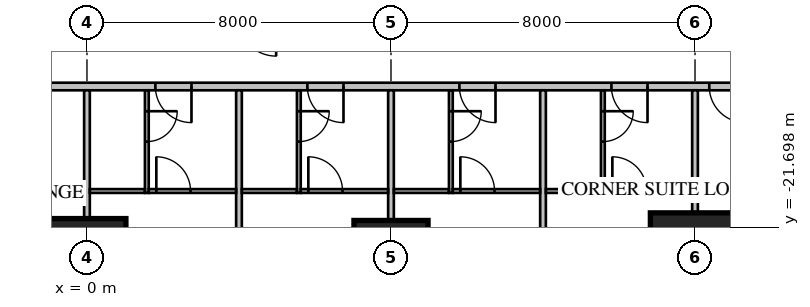
"""IFC4 building model, lengths in metres.
Left out: names, types, materials, properties, quantities, classifications, styles, units other than length and angle.
Written with IfcOpenShell. Run it as: python <this file> out.ifc"""

import sys

from ifc_helpers import new_model, si_unit, direction, frame, frame_2d, origin, origin_2d, place, context, subcontext, project, spatial, rectangle, extrude, element, fill, save


model = new_model("IFC4")
c1 = context("Model", 3, precision=1e-05, world=origin(), true_north=direction((0.0, 1.0)))
c2 = subcontext(c1, "Body", "Model", "MODEL_VIEW")
j1 = project(units=[si_unit("LENGTHUNIT", "METRE"), si_unit("PLANEANGLEUNIT", "RADIAN")], contexts=[c1])
p1 = place(None, origin())
s1 = spatial("IfcSite", under=j1, at=p1, CompositionType="ELEMENT")
p2 = place(p1, origin())
s2 = spatial("IfcBuilding", under=s1, at=p2, CompositionType="ELEMENT")
p3 = place(p2, frame((0.0, 0.0, 27.55)))
s3 = spatial("IfcBuildingStorey", under=s2, at=p3, CompositionType="ELEMENT", Elevation=27.55)
p4 = place(p3, frame((0.0, -22.5, 0.0), z_axis=(0.0, 0.0, 1.0), x_axis=(1.0, 0.0, 0.0)))
e1 = element("IfcColumn", 1, at=p4, inside=s3, PredefinedType="COLUMN", context=c2, shape_type="SweptSolid", body=[
    extrude(rectangle(XDim=2.05, YDim=2.05, at=origin_2d()), origin(), (0.0, 0.0, 1.0), 3.85),
])
p5 = place(p3, frame((8.0, -22.5, 0.0), z_axis=(0.0, 0.0, 1.0), x_axis=(1.0, 0.0, 0.0)))
e2 = element("IfcColumn", 2, at=p5, inside=s3, PredefinedType="COLUMN", context=c2, shape_type="SweptSolid", body=[
    extrude(rectangle(XDim=1.95, YDim=1.95, at=origin_2d()), origin(), (0.0, 0.0, 1.0), 3.85),
])
p6 = place(p3, frame((16.0, -22.5, 0.0), z_axis=(0.0, 0.0, 1.0), x_axis=(1.0, 0.0, 0.0)))
e3 = element("IfcColumn", 3, at=p6, inside=s3, PredefinedType="COLUMN", context=c2, shape_type="SweptSolid", body=[
    extrude(rectangle(XDim=2.35, YDim=2.35, at=origin_2d()), origin(), (0.0, 0.0, 1.0), 3.85),
])
p7 = place(p3, frame((-18.0, -18.0, 0.0), z_axis=(0.0, 0.0, 1.0), x_axis=(1.0, 0.0, 0.0)))
e4 = element("IfcWall", 4, at=p7, inside=s3, PredefinedType="PARTITIONING", context=c2, shape_type="SweptSolid", body=[
    extrude(rectangle(XDim=36.0, YDim=0.2, at=frame_2d((18.0, 0.0))), origin(), (0.0, 0.0, 1.0), 3.65),
])
p8 = place(p7, frame((0.375, 0.0, 0.0)))
e5 = element("IfcOpeningElement", 5, at=p8, cuts=e4, PredefinedType="OPENING", context=c2, shape_type="SweptSolid", body=[
    extrude(rectangle(XDim=1.0, YDim=2.1, at=frame_2d((0.5, 1.05))), frame((0.0, 0.12, 0.0), z_axis=(0.0, -1.0, 0.0), x_axis=(1.0, 0.0, 0.0)), (0.0, 0.0, 1.0), 0.24),
])
p9 = place(p7, frame((2.45, 0.0, 0.0)))
e6 = element("IfcOpeningElement", 6, at=p9, cuts=e4, PredefinedType="OPENING", context=c2, shape_type="SweptSolid", body=[
    extrude(rectangle(XDim=0.8, YDim=2.1, at=frame_2d((0.4, 1.05))), frame((0.0, 0.12, 0.0), z_axis=(0.0, -1.0, 0.0), x_axis=(1.0, 0.0, 0.0)), (0.0, 0.0, 1.0), 0.24),
])
p10 = place(p7, frame((4.05, 0.0, 0.0)))
e7 = element("IfcOpeningElement", 7, at=p10, cuts=e4, PredefinedType="OPENING", context=c2, shape_type="SweptSolid", body=[
    extrude(rectangle(XDim=1.0, YDim=2.1, at=frame_2d((0.5, 1.05))), frame((0.0, 0.12, 0.0), z_axis=(0.0, -1.0, 0.0), x_axis=(1.0, 0.0, 0.0)), (0.0, 0.0, 1.0), 0.24),
])
p11 = place(p7, frame((6.45, 0.0, 0.0)))
e8 = element("IfcOpeningElement", 8, at=p11, cuts=e4, PredefinedType="OPENING", context=c2, shape_type="SweptSolid", body=[
    extrude(rectangle(XDim=0.9, YDim=2.1, at=frame_2d((0.45, 1.05))), frame((0.0, 0.12, 0.0), z_axis=(0.0, -1.0, 0.0), x_axis=(1.0, 0.0, 0.0)), (0.0, 0.0, 1.0), 0.24),
])
p12 = place(p7, frame((8.15, 0.0, 0.0)))
e9 = element("IfcOpeningElement", 9, at=p12, cuts=e4, PredefinedType="OPENING", context=c2, shape_type="SweptSolid", body=[
    extrude(rectangle(XDim=1.0, YDim=2.1, at=frame_2d((0.5, 1.05))), frame((0.0, 0.12, 0.0), z_axis=(0.0, -1.0, 0.0), x_axis=(1.0, 0.0, 0.0)), (0.0, 0.0, 1.0), 0.24),
])
p13 = place(p7, frame((19.8, 0.0, 0.0)))
e10 = element("IfcOpeningElement", 10, at=p13, cuts=e4, PredefinedType="OPENING", context=c2, shape_type="SweptSolid", body=[
    extrude(rectangle(XDim=0.95, YDim=2.1, at=frame_2d((0.475, 1.05))), frame((0.0, 0.12, 0.0), z_axis=(0.0, -1.0, 0.0), x_axis=(1.0, 0.0, 0.0)), (0.0, 0.0, 1.0), 0.24),
])
p14 = place(p7, frame((23.8, 0.0, 0.0)))
e11 = element("IfcOpeningElement", 11, at=p14, cuts=e4, PredefinedType="OPENING", context=c2, shape_type="SweptSolid", body=[
    extrude(rectangle(XDim=0.95, YDim=2.1, at=frame_2d((0.475, 1.05))), frame((0.0, 0.12, 0.0), z_axis=(0.0, -1.0, 0.0), x_axis=(1.0, 0.0, 0.0)), (0.0, 0.0, 1.0), 0.24),
])
p15 = place(p7, frame((27.8, 0.0, 0.0)))
e12 = element("IfcOpeningElement", 12, at=p15, cuts=e4, PredefinedType="OPENING", context=c2, shape_type="SweptSolid", body=[
    extrude(rectangle(XDim=0.95, YDim=2.1, at=frame_2d((0.475, 1.05))), frame((0.0, 0.12, 0.0), z_axis=(0.0, -1.0, 0.0), x_axis=(1.0, 0.0, 0.0)), (0.0, 0.0, 1.0), 0.24),
])
p16 = place(p7, frame((31.8, 0.0, 0.0)))
e13 = element("IfcOpeningElement", 13, at=p16, cuts=e4, PredefinedType="OPENING", context=c2, shape_type="SweptSolid", body=[
    extrude(rectangle(XDim=0.95, YDim=2.1, at=frame_2d((0.475, 1.05))), frame((0.0, 0.12, 0.0), z_axis=(0.0, -1.0, 0.0), x_axis=(1.0, 0.0, 0.0)), (0.0, 0.0, 1.0), 0.24),
])
p17 = place(p7, frame((34.375, 0.0, 0.0)))
e14 = element("IfcOpeningElement", 14, at=p17, cuts=e4, PredefinedType="OPENING", context=c2, shape_type="SweptSolid", body=[
    extrude(rectangle(XDim=0.95, YDim=2.1, at=frame_2d((0.475, 1.05))), frame((0.0, 0.12, 0.0), z_axis=(0.0, -1.0, 0.0), x_axis=(1.0, 0.0, 0.0)), (0.0, 0.0, 1.0), 0.24),
])
p18 = place(p7, frame((11.2, 0.0, 0.0)))
e15 = element("IfcOpeningElement", 15, at=p18, cuts=e4, PredefinedType="OPENING", context=c2, shape_type="SweptSolid", body=[
    extrude(rectangle(XDim=1.0, YDim=2.1, at=frame_2d((0.5, 1.05))), frame((0.0, 0.12, 0.0), z_axis=(0.0, -1.0, 0.0), x_axis=(1.0, 0.0, 0.0)), (0.0, 0.0, 1.0), 0.24),
])
p19 = place(p3, frame((0.0, -18.1, 0.0), z_axis=(0.0, 0.0, 1.0), x_axis=(0.0, -1.0, 0.0)))
e16 = element("IfcWall", 16, at=p19, inside=s3, PredefinedType="PARTITIONING", context=c2, shape_type="SweptSolid", body=[
    extrude(rectangle(XDim=6.6, YDim=0.15, at=frame_2d((3.3, 0.0))), origin(), (0.0, 0.0, 1.0), 2.809),
])
for number, where, z_axis, x_axis in (
    (17, (4.0, -18.1, 0.0), (0.0, 0.0, 1.0), (0.0, -1.0, 0.0)),
    (18, (8.0, -18.1, 0.0), (0.0, 0.0, 1.0), (0.0, -1.0, 0.0)),
    (19, (12.0, -18.1, 0.0), (0.0, 0.0, 1.0), (0.0, -1.0, 0.0)),
):
    element("IfcWall", number, at=place(p3, frame(where, z_axis=z_axis, x_axis=x_axis)), inside=s3, PredefinedType="PARTITIONING", context=c2, shape_type="SweptSolid", body=[
        extrude(rectangle(XDim=6.6, YDim=0.15, at=frame_2d((3.3, 0.0))), origin(), (0.0, 0.0, 1.0), 3.65),
    ])
p20 = place(p3, frame((16.0, -18.1, 0.0), z_axis=(0.0, 0.0, 1.0), x_axis=(0.0, -1.0, 0.0)))
e20 = element("IfcWall", 20, at=p20, inside=s3, PredefinedType="PARTITIONING", context=c2, shape_type="SweptSolid", body=[
    extrude(rectangle(XDim=6.589, YDim=0.15, at=frame_2d((3.295, 0.0))), origin(), (0.0, 0.0, 1.0), 3.65),
])
p21 = place(p3, frame((1.575, -18.1, 0.0), z_axis=(0.0, 0.0, 1.0), x_axis=(0.0, -1.0, 0.0)))
e21 = element("IfcWall", 21, at=p21, inside=s3, PredefinedType="PARTITIONING", context=c2, shape_type="SweptSolid", body=[
    extrude(rectangle(XDim=2.7, YDim=0.1, at=frame_2d((1.35, 0.0))), origin(), (0.0, 0.0, 1.0), 3.65),
])
p22 = place(p21, frame((0.55, 0.0, 0.0)))
e22 = element("IfcOpeningElement", 22, at=p22, cuts=e21, PredefinedType="OPENING", context=c2, shape_type="SweptSolid", body=[
    extrude(rectangle(XDim=0.8, YDim=2.1, at=frame_2d((0.4, 1.05))), frame((0.0, 0.07, 0.0), z_axis=(0.0, -1.0, 0.0), x_axis=(1.0, 0.0, 0.0)), (0.0, 0.0, 1.0), 0.14),
])
p23 = place(p3, frame((0.075, -20.75, 0.0), z_axis=(0.0, 0.0, 1.0), x_axis=(1.0, 0.0, 0.0)))
e23 = element("IfcWall", 23, at=p23, inside=s3, PredefinedType="PARTITIONING", context=c2, shape_type="SweptSolid", body=[
    extrude(rectangle(XDim=1.45, YDim=0.1, at=frame_2d((0.725, 0.0))), origin(), (0.0, 0.0, 1.0), 3.65),
])
p24 = place(p3, frame((5.575, -18.1, 0.0), z_axis=(0.0, 0.0, 1.0), x_axis=(0.0, -1.0, 0.0)))
e24 = element("IfcWall", 24, at=p24, inside=s3, PredefinedType="PARTITIONING", context=c2, shape_type="SweptSolid", body=[
    extrude(rectangle(XDim=2.7, YDim=0.1, at=frame_2d((1.35, 0.0))), origin(), (0.0, 0.0, 1.0), 3.65),
])
p25 = place(p24, frame((0.55, 0.0, 0.0)))
e25 = element("IfcOpeningElement", 25, at=p25, cuts=e24, PredefinedType="OPENING", context=c2, shape_type="SweptSolid", body=[
    extrude(rectangle(XDim=0.8, YDim=2.1, at=frame_2d((0.4, 1.05))), frame((0.0, 0.07, 0.0), z_axis=(0.0, -1.0, 0.0), x_axis=(1.0, 0.0, 0.0)), (0.0, 0.0, 1.0), 0.14),
])
p26 = place(p3, frame((4.075, -20.75, 0.0), z_axis=(0.0, 0.0, 1.0), x_axis=(1.0, 0.0, 0.0)))
e26 = element("IfcWall", 26, at=p26, inside=s3, PredefinedType="PARTITIONING", context=c2, shape_type="SweptSolid", body=[
    extrude(rectangle(XDim=1.45, YDim=0.1, at=frame_2d((0.725, 0.0))), origin(), (0.0, 0.0, 1.0), 3.65),
])
p27 = place(p3, frame((9.575, -18.1, 0.0), z_axis=(0.0, 0.0, 1.0), x_axis=(0.0, -1.0, 0.0)))
e27 = element("IfcWall", 27, at=p27, inside=s3, PredefinedType="PARTITIONING", context=c2, shape_type="SweptSolid", body=[
    extrude(rectangle(XDim=2.7, YDim=0.1, at=frame_2d((1.35, 0.0))), origin(), (0.0, 0.0, 1.0), 3.65),
])
p28 = place(p27, frame((0.55, 0.0, 0.0)))
e28 = element("IfcOpeningElement", 28, at=p28, cuts=e27, PredefinedType="OPENING", context=c2, shape_type="SweptSolid", body=[
    extrude(rectangle(XDim=0.8, YDim=2.1, at=frame_2d((0.4, 1.05))), frame((0.0, 0.07, 0.0), z_axis=(0.0, -1.0, 0.0), x_axis=(1.0, 0.0, 0.0)), (0.0, 0.0, 1.0), 0.14),
])
p29 = place(p3, frame((8.075, -20.75, 0.0), z_axis=(0.0, 0.0, 1.0), x_axis=(1.0, 0.0, 0.0)))
e29 = element("IfcWall", 29, at=p29, inside=s3, PredefinedType="PARTITIONING", context=c2, shape_type="SweptSolid", body=[
    extrude(rectangle(XDim=1.45, YDim=0.1, at=frame_2d((0.725, 0.0))), origin(), (0.0, 0.0, 1.0), 3.65),
])
p30 = place(p3, frame((13.575, -18.1, 0.0), z_axis=(0.0, 0.0, 1.0), x_axis=(0.0, -1.0, 0.0)))
e30 = element("IfcWall", 30, at=p30, inside=s3, PredefinedType="PARTITIONING", context=c2, shape_type="SweptSolid", body=[
    extrude(rectangle(XDim=2.7, YDim=0.1, at=frame_2d((1.35, 0.0))), origin(), (0.0, 0.0, 1.0), 3.65),
])
p31 = place(p30, frame((0.55, 0.0, 0.0)))
e31 = element("IfcOpeningElement", 31, at=p31, cuts=e30, PredefinedType="OPENING", context=c2, shape_type="SweptSolid", body=[
    extrude(rectangle(XDim=0.8, YDim=2.1, at=frame_2d((0.4, 1.05))), frame((0.0, 0.07, 0.0), z_axis=(0.0, -1.0, 0.0), x_axis=(1.0, 0.0, 0.0)), (0.0, 0.0, 1.0), 0.14),
])
p32 = place(p3, frame((12.075, -20.75, 0.0), z_axis=(0.0, 0.0, 1.0), x_axis=(1.0, 0.0, 0.0)))
e32 = element("IfcWall", 32, at=p32, inside=s3, PredefinedType="PARTITIONING", context=c2, shape_type="SweptSolid", body=[
    extrude(rectangle(XDim=1.45, YDim=0.1, at=frame_2d((0.725, 0.0))), origin(), (0.0, 0.0, 1.0), 3.65),
])
p33 = place(p3, frame((1.625, -20.75, 0.0), z_axis=(0.0, 0.0, 1.0), x_axis=(1.0, 0.0, 0.0)))
e33 = element("IfcWall", 33, at=p33, inside=s3, PredefinedType="PARTITIONING", context=c2, shape_type="SweptSolid", body=[
    extrude(rectangle(XDim=2.3, YDim=0.1, at=frame_2d((1.15, 0.0))), origin(), (0.0, 0.0, 1.0), 3.65),
])
p34 = place(p33, frame((0.2, 0.0, 0.0)))
e34 = element("IfcOpeningElement", 34, at=p34, cuts=e33, PredefinedType="OPENING", context=c2, shape_type="SweptSolid", body=[
    extrude(rectangle(XDim=0.9, YDim=2.1, at=frame_2d((0.45, 1.05))), frame((0.0, 0.07, 0.0), z_axis=(0.0, -1.0, 0.0), x_axis=(1.0, 0.0, 0.0)), (0.0, 0.0, 1.0), 0.14),
])
p35 = place(p3, frame((5.625, -20.75, 0.0), z_axis=(0.0, 0.0, 1.0), x_axis=(1.0, 0.0, 0.0)))
e35 = element("IfcWall", 35, at=p35, inside=s3, PredefinedType="PARTITIONING", context=c2, shape_type="SweptSolid", body=[
    extrude(rectangle(XDim=2.3, YDim=0.1, at=frame_2d((1.15, 0.0))), origin(), (0.0, 0.0, 1.0), 3.65),
])
p36 = place(p35, frame((0.2, 0.0, 0.0)))
e36 = element("IfcOpeningElement", 36, at=p36, cuts=e35, PredefinedType="OPENING", context=c2, shape_type="SweptSolid", body=[
    extrude(rectangle(XDim=0.9, YDim=2.1, at=frame_2d((0.45, 1.05))), frame((0.0, 0.07, 0.0), z_axis=(0.0, -1.0, 0.0), x_axis=(1.0, 0.0, 0.0)), (0.0, 0.0, 1.0), 0.14),
])
p37 = place(p3, frame((9.625, -20.75, 0.0), z_axis=(0.0, 0.0, 1.0), x_axis=(1.0, 0.0, 0.0)))
e37 = element("IfcWall", 37, at=p37, inside=s3, PredefinedType="PARTITIONING", context=c2, shape_type="SweptSolid", body=[
    extrude(rectangle(XDim=2.3, YDim=0.1, at=frame_2d((1.15, 0.0))), origin(), (0.0, 0.0, 1.0), 3.65),
])
p38 = place(p37, frame((0.2, 0.0, 0.0)))
e38 = element("IfcOpeningElement", 38, at=p38, cuts=e37, PredefinedType="OPENING", context=c2, shape_type="SweptSolid", body=[
    extrude(rectangle(XDim=0.9, YDim=2.1, at=frame_2d((0.45, 1.05))), frame((0.0, 0.07, 0.0), z_axis=(0.0, -1.0, 0.0), x_axis=(1.0, 0.0, 0.0)), (0.0, 0.0, 1.0), 0.14),
])
p39 = place(p3, frame((13.625, -20.75, 0.0), z_axis=(0.0, 0.0, 1.0), x_axis=(1.0, 0.0, 0.0)))
e39 = element("IfcWall", 39, at=p39, inside=s3, PredefinedType="PARTITIONING", context=c2, shape_type="SweptSolid", body=[
    extrude(rectangle(XDim=2.3, YDim=0.1, at=frame_2d((1.15, 0.0))), origin(), (0.0, 0.0, 1.0), 3.65),
])
p40 = place(p39, frame((0.2, 0.0, 0.0)))
e40 = element("IfcOpeningElement", 40, at=p40, cuts=e39, PredefinedType="OPENING", context=c2, shape_type="SweptSolid", body=[
    extrude(rectangle(XDim=0.9, YDim=2.1, at=frame_2d((0.45, 1.05))), frame((0.0, 0.07, 0.0), z_axis=(0.0, -1.0, 0.0), x_axis=(1.0, 0.0, 0.0)), (0.0, 0.0, 1.0), 0.14),
])
p41 = place(p13, origin())
e41 = element("IfcDoor", 41, at=p41, inside=s3, OperationType="SINGLE_SWING_RIGHT", PredefinedType="DOOR", context=c2, shape_type="SweptSolid", body=[
    extrude(rectangle(XDim=0.95, YDim=2.1, at=frame_2d((0.475, 1.05))), frame((0.0, 0.025, 0.0), z_axis=(0.0, -1.0, 0.0), x_axis=(1.0, 0.0, 0.0)), (0.0, 0.0, 1.0), 0.05),
])
fill(e10, e41)
p42 = place(p22, origin())
e42 = element("IfcDoor", 42, at=p42, inside=s3, OperationType="SINGLE_SWING_LEFT", PredefinedType="DOOR", context=c2, shape_type="SweptSolid", body=[
    extrude(rectangle(XDim=0.8, YDim=2.1, at=frame_2d((0.4, 1.05))), frame((0.0, 0.025, 0.0), z_axis=(0.0, -1.0, 0.0), x_axis=(1.0, 0.0, 0.0)), (0.0, 0.0, 1.0), 0.05),
])
fill(e22, e42)
p43 = place(p14, origin())
e43 = element("IfcDoor", 43, at=p43, inside=s3, OperationType="SINGLE_SWING_RIGHT", PredefinedType="DOOR", context=c2, shape_type="SweptSolid", body=[
    extrude(rectangle(XDim=0.95, YDim=2.1, at=frame_2d((0.475, 1.05))), frame((0.0, 0.025, 0.0), z_axis=(0.0, -1.0, 0.0), x_axis=(1.0, 0.0, 0.0)), (0.0, 0.0, 1.0), 0.05),
])
fill(e11, e43)
p44 = place(p25, origin())
e44 = element("IfcDoor", 44, at=p44, inside=s3, OperationType="SINGLE_SWING_LEFT", PredefinedType="DOOR", context=c2, shape_type="SweptSolid", body=[
    extrude(rectangle(XDim=0.8, YDim=2.1, at=frame_2d((0.4, 1.05))), frame((0.0, 0.025, 0.0), z_axis=(0.0, -1.0, 0.0), x_axis=(1.0, 0.0, 0.0)), (0.0, 0.0, 1.0), 0.05),
])
fill(e25, e44)
p45 = place(p15, origin())
e45 = element("IfcDoor", 45, at=p45, inside=s3, OperationType="SINGLE_SWING_RIGHT", PredefinedType="DOOR", context=c2, shape_type="SweptSolid", body=[
    extrude(rectangle(XDim=0.95, YDim=2.1, at=frame_2d((0.475, 1.05))), frame((0.0, 0.025, 0.0), z_axis=(0.0, -1.0, 0.0), x_axis=(1.0, 0.0, 0.0)), (0.0, 0.0, 1.0), 0.05),
])
fill(e12, e45)
p46 = place(p28, origin())
e46 = element("IfcDoor", 46, at=p46, inside=s3, OperationType="SINGLE_SWING_LEFT", PredefinedType="DOOR", context=c2, shape_type="SweptSolid", body=[
    extrude(rectangle(XDim=0.8, YDim=2.1, at=frame_2d((0.4, 1.05))), frame((0.0, 0.025, 0.0), z_axis=(0.0, -1.0, 0.0), x_axis=(1.0, 0.0, 0.0)), (0.0, 0.0, 1.0), 0.05),
])
fill(e28, e46)
p47 = place(p16, origin())
e47 = element("IfcDoor", 47, at=p47, inside=s3, OperationType="SINGLE_SWING_RIGHT", PredefinedType="DOOR", context=c2, shape_type="SweptSolid", body=[
    extrude(rectangle(XDim=0.95, YDim=2.1, at=frame_2d((0.475, 1.05))), frame((0.0, 0.025, 0.0), z_axis=(0.0, -1.0, 0.0), x_axis=(1.0, 0.0, 0.0)), (0.0, 0.0, 1.0), 0.05),
])
fill(e13, e47)
p48 = place(p31, origin())
e48 = element("IfcDoor", 48, at=p48, inside=s3, OperationType="SINGLE_SWING_LEFT", PredefinedType="DOOR", context=c2, shape_type="SweptSolid", body=[
    extrude(rectangle(XDim=0.8, YDim=2.1, at=frame_2d((0.4, 1.05))), frame((0.0, 0.025, 0.0), z_axis=(0.0, -1.0, 0.0), x_axis=(1.0, 0.0, 0.0)), (0.0, 0.0, 1.0), 0.05),
])
fill(e31, e48)
p49 = place(p17, origin())
e49 = element("IfcDoor", 49, at=p49, inside=s3, OperationType="SINGLE_SWING_RIGHT", PredefinedType="DOOR", context=c2, shape_type="SweptSolid", body=[
    extrude(rectangle(XDim=0.95, YDim=2.1, at=frame_2d((0.475, 1.05))), frame((0.0, 0.025, 0.0), z_axis=(0.0, -1.0, 0.0), x_axis=(1.0, 0.0, 0.0)), (0.0, 0.0, 1.0), 0.05),
])
fill(e14, e49)
p50 = place(p34, origin())
e50 = element("IfcDoor", 50, at=p50, inside=s3, OperationType="SINGLE_SWING_LEFT", PredefinedType="DOOR", context=c2, shape_type="SweptSolid", body=[
    extrude(rectangle(XDim=0.9, YDim=2.1, at=frame_2d((0.45, 1.05))), frame((0.0, 0.025, 0.0), z_axis=(0.0, -1.0, 0.0), x_axis=(1.0, 0.0, 0.0)), (0.0, 0.0, 1.0), 0.05),
])
fill(e34, e50)
p51 = place(p36, origin())
e51 = element("IfcDoor", 51, at=p51, inside=s3, OperationType="SINGLE_SWING_LEFT", PredefinedType="DOOR", context=c2, shape_type="SweptSolid", body=[
    extrude(rectangle(XDim=0.9, YDim=2.1, at=frame_2d((0.45, 1.05))), frame((0.0, 0.025, 0.0), z_axis=(0.0, -1.0, 0.0), x_axis=(1.0, 0.0, 0.0)), (0.0, 0.0, 1.0), 0.05),
])
fill(e36, e51)
p52 = place(p38, origin())
e52 = element("IfcDoor", 52, at=p52, inside=s3, OperationType="SINGLE_SWING_LEFT", PredefinedType="DOOR", context=c2, shape_type="SweptSolid", body=[
    extrude(rectangle(XDim=0.9, YDim=2.1, at=frame_2d((0.45, 1.05))), frame((0.0, 0.025, 0.0), z_axis=(0.0, -1.0, 0.0), x_axis=(1.0, 0.0, 0.0)), (0.0, 0.0, 1.0), 0.05),
])
fill(e38, e52)
p53 = place(p40, origin())
e53 = element("IfcDoor", 53, at=p53, inside=s3, OperationType="SINGLE_SWING_LEFT", PredefinedType="DOOR", context=c2, shape_type="SweptSolid", body=[
    extrude(rectangle(XDim=0.9, YDim=2.1, at=frame_2d((0.45, 1.05))), frame((0.0, 0.025, 0.0), z_axis=(0.0, -1.0, 0.0), x_axis=(1.0, 0.0, 0.0)), (0.0, 0.0, 1.0), 0.05),
])
fill(e40, e53)
save(model, sys.argv[1])
